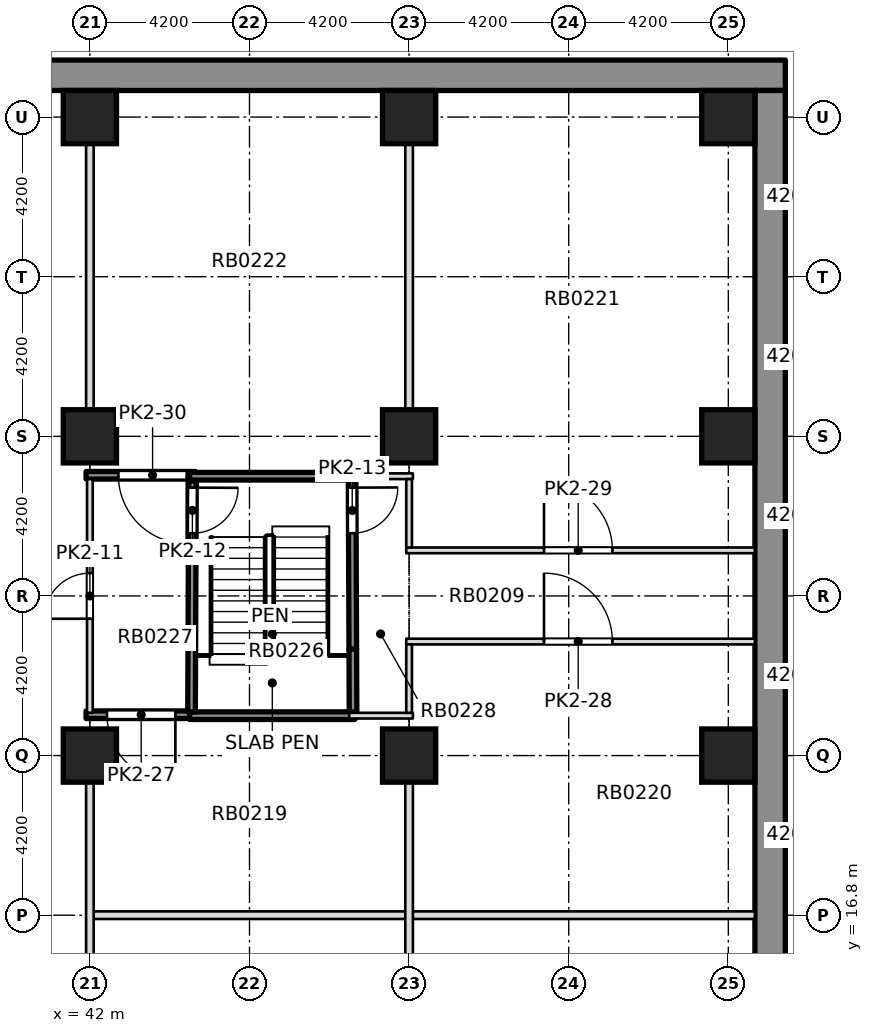
"""IFC4 building model, lengths in metres.
Left out: names, types, materials, properties, quantities, classifications, styles, units other than length and angle.
Written with IfcOpenShell. Run it as: python <this file> out.ifc"""

import sys

from ifc_helpers import new_model, si_unit, direction, frame, frame_2d, origin, origin_2d, place, context, subcontext, project, spatial, rectangle, extrude, element, fill, save


model = new_model("IFC4")
c1 = context("Model", 3, precision=1e-05, world=origin(), true_north=direction((0.0, 1.0)))
c2 = subcontext(c1, "Body", "Model", "MODEL_VIEW")
j1 = project(units=[si_unit("LENGTHUNIT", "METRE"), si_unit("PLANEANGLEUNIT", "RADIAN")], contexts=[c1])
p1 = place(None, origin())
s1 = spatial("IfcSite", under=j1, at=p1, CompositionType="ELEMENT")
p2 = place(p1, origin())
s2 = spatial("IfcBuilding", under=s1, at=p2, CompositionType="ELEMENT")
p3 = place(p2, frame((0.0, 0.0, -8.4)))
s3 = spatial("IfcBuildingStorey", under=s2, at=p3, CompositionType="ELEMENT", Elevation=-8.4)
p4 = place(p3, frame((-43.5, 38.9, -0.5), z_axis=(0.0, 0.0, 1.0), x_axis=(1.0, 0.0, 0.0)))
e1 = element("IfcWall", 1, at=p4, inside=s3, PredefinedType="SOLIDWALL", context=c2, shape_type="SweptSolid", body=[
    extrude(rectangle(XDim=103.8, YDim=0.8, at=frame_2d((51.9, 0.0))), origin(), (0.0, 0.0, 1.0), 4.7),
])
p5 = place(p3, frame((59.9, -38.5, -0.5), z_axis=(0.0, 0.0, 1.0), x_axis=(0.0, 1.0, 0.0)))
e2 = element("IfcWall", 2, at=p5, inside=s3, PredefinedType="SOLIDWALL", context=c2, shape_type="SweptSolid", body=[
    extrude(rectangle(XDim=77.0, YDim=0.8, at=frame_2d((38.5, 0.0))), origin(), (0.0, 0.0, 1.0), 4.7),
])
for number, where, z_axis, x_axis in (
    (3, (42.0, 21.0, -0.5), (0.0, 0.0, 1.0), (1.0, 0.0, 0.0)),
    (4, (50.4, 21.0, -0.5), (0.0, 0.0, 1.0), (1.0, 0.0, 0.0)),
    (5, (58.8, 21.0, -0.5), (0.0, 0.0, 1.0), (1.0, 0.0, 0.0)),
    (6, (42.0, 29.4, -0.5), (0.0, 0.0, 1.0), (1.0, 0.0, 0.0)),
    (7, (50.4, 29.4, -0.5), (0.0, 0.0, 1.0), (1.0, 0.0, 0.0)),
    (8, (58.8, 29.4, -0.5), (0.0, 0.0, 1.0), (1.0, 0.0, 0.0)),
    (9, (42.0, 37.8, -0.5), (0.0, 0.0, 1.0), (1.0, 0.0, 0.0)),
    (10, (50.4, 37.8, -0.5), (0.0, 0.0, 1.0), (1.0, 0.0, 0.0)),
    (11, (58.8, 37.8, -0.5), (0.0, 0.0, 1.0), (1.0, 0.0, 0.0)),
):
    element("IfcColumn", number, at=place(p3, frame(where, z_axis=z_axis, x_axis=x_axis)), inside=s3, PredefinedType="COLUMN", context=c2, shape_type="SweptSolid", body=[
        extrude(rectangle(XDim=1.4, YDim=1.4, at=origin_2d()), origin(), (0.0, 0.0, 1.0), 4.7),
    ])
p6 = place(p3, frame((42.1, 16.8, 0.0), z_axis=(0.0, 0.0, 1.0), x_axis=(1.0, 0.0, 0.0)))
e12 = element("IfcWall", 12, at=p6, inside=s3, PredefinedType="PARTITIONING", context=c2, shape_type="SweptSolid", body=[
    extrude(rectangle(XDim=17.399, YDim=0.2, at=frame_2d((8.699, 0.0))), origin(), (0.0, 0.0, 1.0), 3.85),
])
p7 = place(p3, frame((41.9, 22.075, 0.0), z_axis=(0.0, 0.0, 1.0), x_axis=(1.0, 0.0, 0.0)))
e13 = element("IfcWall", 13, at=p7, inside=s3, PredefinedType="SOLIDWALL", context=c2, shape_type="SweptSolid", body=[
    extrude(rectangle(XDim=2.875, YDim=0.2, at=frame_2d((1.438, 0.0))), origin(), (0.0, 0.0, 1.0), 3.85),
])
p8 = place(p7, frame((0.55, 0.0, 0.0)))
e14 = element("IfcOpeningElement", 14, at=p8, cuts=e13, PredefinedType="OPENING", context=c2, shape_type="SweptSolid", body=[
    extrude(rectangle(XDim=1.8, YDim=2.1, at=frame_2d((0.9, 1.05))), frame((0.0, 0.11, 0.0), z_axis=(0.0, -1.0, 0.0), x_axis=(1.0, 0.0, 0.0)), (0.0, 0.0, 1.0), 0.22),
])
p9 = place(p3, frame((44.625, 22.05, 0.0), z_axis=(0.0, 0.0, 1.0), x_axis=(1.0, 0.0, 0.0)))
e15 = element("IfcWall", 15, at=p9, inside=s3, PredefinedType="SOLIDWALL", context=c2, shape_type="SweptSolid", body=[
    extrude(rectangle(XDim=4.35, YDim=0.2, at=frame_2d((2.175, 0.0))), origin(), (0.0, 0.0, 1.0), 3.85),
])
p10 = place(p3, frame((48.825, 22.05, 0.0), z_axis=(0.0, 0.0, 1.0), x_axis=(1.0, 0.0, 0.0)))
e16 = element("IfcWall", 16, at=p10, inside=s3, PredefinedType="PARTITIONING", context=c2, shape_type="SweptSolid", body=[
    extrude(rectangle(XDim=1.675, YDim=0.15, at=frame_2d((0.837, 0.0))), origin(), (0.0, 0.0, 1.0), 3.85),
])
p11 = place(p3, frame((50.325, 24.0, 0.0), z_axis=(0.0, 0.0, 1.0), x_axis=(1.0, 0.0, 0.0)))
e17 = element("IfcWall", 17, at=p11, inside=s3, PredefinedType="PARTITIONING", context=c2, shape_type="SweptSolid", body=[
    extrude(rectangle(XDim=9.174, YDim=0.15, at=frame_2d((4.587, 0.0))), origin(), (0.0, 0.0, 1.0), 3.85),
])
p12 = place(p11, frame((3.625, 0.0, 0.0)))
e18 = element("IfcOpeningElement", 18, at=p12, cuts=e17, PredefinedType="OPENING", context=c2, shape_type="SweptSolid", body=[
    extrude(rectangle(XDim=1.8, YDim=2.1, at=frame_2d((0.9, 1.05))), frame((0.0, 0.085, 0.0), z_axis=(0.0, -1.0, 0.0), x_axis=(1.0, 0.0, 0.0)), (0.0, 0.0, 1.0), 0.17),
])
p13 = place(p3, frame((50.325, 26.4, 0.0), z_axis=(0.0, 0.0, 1.0), x_axis=(1.0, 0.0, 0.0)))
e19 = element("IfcWall", 19, at=p13, inside=s3, PredefinedType="PARTITIONING", context=c2, shape_type="SweptSolid", body=[
    extrude(rectangle(XDim=9.174, YDim=0.15, at=frame_2d((4.587, 0.0))), origin(), (0.0, 0.0, 1.0), 3.85),
])
p14 = place(p13, frame((3.625, 0.0, 0.0)))
e20 = element("IfcOpeningElement", 20, at=p14, cuts=e19, PredefinedType="OPENING", context=c2, shape_type="SweptSolid", body=[
    extrude(rectangle(XDim=1.8, YDim=2.1, at=frame_2d((0.9, 1.05))), frame((0.0, 0.085, 0.0), z_axis=(0.0, -1.0, 0.0), x_axis=(1.0, 0.0, 0.0)), (0.0, 0.0, 1.0), 0.17),
])
p15 = place(p3, frame((41.9, 28.375, 0.0), z_axis=(0.0, 0.0, 1.0), x_axis=(1.0, 0.0, 0.0)))
e21 = element("IfcWall", 21, at=p15, inside=s3, PredefinedType="SOLIDWALL", context=c2, shape_type="SweptSolid", body=[
    extrude(rectangle(XDim=2.875, YDim=0.2, at=frame_2d((1.438, 0.0))), origin(), (0.0, 0.0, 1.0), 3.85),
])
p16 = place(p15, frame((0.85, 0.0, 0.0)))
e22 = element("IfcOpeningElement", 22, at=p16, cuts=e21, PredefinedType="OPENING", context=c2, shape_type="SweptSolid", body=[
    extrude(rectangle(XDim=1.8, YDim=2.1, at=frame_2d((0.9, 1.05))), frame((0.0, 0.11, 0.0), z_axis=(0.0, -1.0, 0.0), x_axis=(1.0, 0.0, 0.0)), (0.0, 0.0, 1.0), 0.22),
])
p17 = place(p3, frame((44.625, 28.35, 0.0), z_axis=(0.0, 0.0, 1.0), x_axis=(1.0, 0.0, 0.0)))
e23 = element("IfcWall", 23, at=p17, inside=s3, PredefinedType="SOLIDWALL", context=c2, shape_type="SweptSolid", body=[
    extrude(rectangle(XDim=4.35, YDim=0.2, at=frame_2d((2.175, 0.0))), origin(), (0.0, 0.0, 1.0), 3.85),
])
p18 = place(p3, frame((48.825, 28.35, 0.0), z_axis=(0.0, 0.0, 1.0), x_axis=(1.0, 0.0, 0.0)))
e24 = element("IfcWall", 24, at=p18, inside=s3, PredefinedType="PARTITIONING", context=c2, shape_type="SweptSolid", body=[
    extrude(rectangle(XDim=1.675, YDim=0.15, at=frame_2d((0.837, 0.0))), origin(), (0.0, 0.0, 1.0), 3.85),
])
p19 = place(p3, frame((42.0, 13.3, 0.0), z_axis=(0.0, 0.0, 1.0), x_axis=(0.0, 1.0, 0.0)))
e25 = element("IfcWall", 25, at=p19, inside=s3, PredefinedType="PARTITIONING", context=c2, shape_type="SweptSolid", body=[
    extrude(rectangle(XDim=7.0, YDim=0.2, at=frame_2d((3.5, 0.0))), origin(), (0.0, 0.0, 1.0), 3.85),
])
p20 = place(p3, frame((42.0, 22.125, 0.0), z_axis=(0.0, 0.0, 1.0), x_axis=(0.0, 1.0, 0.0)))
e26 = element("IfcWall", 26, at=p20, inside=s3, PredefinedType="PARTITIONING", context=c2, shape_type="SweptSolid", body=[
    extrude(rectangle(XDim=6.15, YDim=0.15, at=frame_2d((3.075, 0.0))), origin(), (0.0, 0.0, 1.0), 3.85),
])
p21 = place(p20, frame((2.475, 0.0, 0.0)))
e27 = element("IfcOpeningElement", 27, at=p21, cuts=e26, PredefinedType="OPENING", context=c2, shape_type="SweptSolid", body=[
    extrude(rectangle(XDim=1.2, YDim=2.1, at=frame_2d((0.6, 1.05))), frame((0.0, 0.085, 0.0), z_axis=(0.0, -1.0, 0.0), x_axis=(1.0, 0.0, 0.0)), (0.0, 0.0, 1.0), 0.17),
])
p22 = place(p3, frame((42.0, 30.1, 0.0), z_axis=(0.0, 0.0, 1.0), x_axis=(0.0, 1.0, 0.0)))
e28 = element("IfcWall", 28, at=p22, inside=s3, PredefinedType="PARTITIONING", context=c2, shape_type="SweptSolid", body=[
    extrude(rectangle(XDim=7.0, YDim=0.2, at=frame_2d((3.5, 0.0))), origin(), (0.0, 0.0, 1.0), 3.85),
])
p23 = place(p3, frame((44.675, 22.15, 0.0), z_axis=(0.0, 0.0, 1.0), x_axis=(0.004098985015, 0.999991599126, 0.0)))
e29 = element("IfcWall", 29, at=p23, inside=s3, PredefinedType="SOLIDWALL", context=c2, shape_type="SweptSolid", body=[
    extrude(rectangle(XDim=6.075, YDim=0.2, at=frame_2d((3.038, 0.0))), origin(), (0.0, 0.0, 1.0), 3.85),
])
p24 = place(p23, frame((4.7, 0.0, 0.0)))
e30 = element("IfcOpeningElement", 30, at=p24, cuts=e29, PredefinedType="OPENING", context=c2, shape_type="SweptSolid", body=[
    extrude(rectangle(XDim=1.2, YDim=2.1, at=frame_2d((0.6, 1.05))), frame((0.0, 0.11, 0.0), z_axis=(0.0, -1.0, 0.0), x_axis=(1.0, 0.0, 0.0)), (0.0, 0.0, 1.0), 0.22),
])
p25 = place(p3, frame((48.918, 23.8, 0.0), z_axis=(0.0, 0.0, 1.0), x_axis=(-0.004091618778, 0.999991629293, 0.0)))
e31 = element("IfcWall", 31, at=p25, inside=s3, PredefinedType="SOLIDWALL", context=c2, shape_type="SweptSolid", body=[
    extrude(rectangle(XDim=4.475, YDim=0.2, at=frame_2d((2.238, 0.0))), origin(), (0.0, 0.0, 1.0), 3.85),
])
p26 = place(p25, frame((3.05, 0.0, 0.0)))
e32 = element("IfcOpeningElement", 32, at=p26, cuts=e31, PredefinedType="OPENING", context=c2, shape_type="SweptSolid", body=[
    extrude(rectangle(XDim=1.2, YDim=2.1, at=frame_2d((0.6, 1.05))), frame((0.0, 0.11, 0.0), z_axis=(0.0, -1.0, 0.0), x_axis=(1.0, 0.0, 0.0)), (0.0, 0.0, 1.0), 0.22),
])
p27 = place(p3, frame((50.4, 13.3, 0.0), z_axis=(0.0, 0.0, 1.0), x_axis=(0.0, 1.0, 0.0)))
e33 = element("IfcWall", 33, at=p27, inside=s3, PredefinedType="PARTITIONING", context=c2, shape_type="SweptSolid", body=[
    extrude(rectangle(XDim=7.0, YDim=0.2, at=frame_2d((3.5, 0.0))), origin(), (0.0, 0.0, 1.0), 3.85),
])
p28 = place(p3, frame((50.4, 22.125, 0.0), z_axis=(0.0, 0.0, 1.0), x_axis=(0.0, 1.0, 0.0)))
e34 = element("IfcWall", 34, at=p28, inside=s3, PredefinedType="PARTITIONING", context=c2, shape_type="SweptSolid", body=[
    extrude(rectangle(XDim=1.8, YDim=0.15, at=frame_2d((0.9, 0.0))), origin(), (0.0, 0.0, 1.0), 3.85),
])
p29 = place(p3, frame((50.4, 26.475, 0.0), z_axis=(0.0, 0.0, 1.0), x_axis=(0.0, 1.0, 0.0)))
e35 = element("IfcWall", 35, at=p29, inside=s3, PredefinedType="PARTITIONING", context=c2, shape_type="SweptSolid", body=[
    extrude(rectangle(XDim=1.8, YDim=0.15, at=frame_2d((0.9, 0.0))), origin(), (0.0, 0.0, 1.0), 3.85),
])
p30 = place(p3, frame((50.4, 30.1, 0.0), z_axis=(0.0, 0.0, 1.0), x_axis=(0.0, 1.0, 0.0)))
e36 = element("IfcWall", 36, at=p30, inside=s3, PredefinedType="PARTITIONING", context=c2, shape_type="SweptSolid", body=[
    extrude(rectangle(XDim=7.0, YDim=0.2, at=frame_2d((3.5, 0.0))), origin(), (0.0, 0.0, 1.0), 3.85),
])
p31 = place(p3, frame((48.925, 22.15, 0.0), z_axis=(0.0, 0.0, 1.0), x_axis=(-0.003995232985, 0.999992019025, 0.0)))
e37 = element("IfcWall", 37, at=p31, inside=s3, PredefinedType="SOLIDWALL", context=c2, shape_type="SweptSolid", body=[
    extrude(rectangle(XDim=1.65, YDim=0.2, at=frame_2d((0.825, 0.0))), origin(), (0.0, 0.0, 1.0), 3.85),
])
p32 = place(p21, origin())
e38 = element("IfcDoor", 38, at=p32, inside=s3, OperationType="DOUBLE_DOOR_SINGLE_SWING", PredefinedType="DOOR", context=c2, shape_type="SweptSolid", body=[
    extrude(rectangle(XDim=1.2, YDim=2.1, at=frame_2d((0.6, 1.05))), frame((0.0, 0.025, 0.0), z_axis=(0.0, -1.0, 0.0), x_axis=(1.0, 0.0, 0.0)), (0.0, 0.0, 1.0), 0.05),
])
fill(e27, e38)
p33 = place(p24, origin())
e39 = element("IfcDoor", 39, at=p33, inside=s3, OperationType="DOUBLE_DOOR_SINGLE_SWING", PredefinedType="DOOR", context=c2, shape_type="SweptSolid", body=[
    extrude(rectangle(XDim=1.2, YDim=2.1, at=frame_2d((0.6, 1.05))), frame((0.0, 0.025, 0.0), z_axis=(0.0, -1.0, 0.0), x_axis=(1.0, 0.0, 0.0)), (0.0, 0.0, 1.0), 0.05),
])
fill(e30, e39)
p34 = place(p26, origin())
e40 = element("IfcDoor", 40, at=p34, inside=s3, OperationType="DOUBLE_DOOR_SINGLE_SWING", PredefinedType="DOOR", context=c2, shape_type="SweptSolid", body=[
    extrude(rectangle(XDim=1.2, YDim=2.1, at=frame_2d((0.6, 1.05))), frame((0.0, 0.025, 0.0), z_axis=(0.0, -1.0, 0.0), x_axis=(1.0, 0.0, 0.0)), (0.0, 0.0, 1.0), 0.05),
])
fill(e32, e40)
p35 = place(p8, origin())
e41 = element("IfcDoor", 41, at=p35, inside=s3, OperationType="DOUBLE_DOOR_SINGLE_SWING", PredefinedType="DOOR", context=c2, shape_type="SweptSolid", body=[
    extrude(rectangle(XDim=1.8, YDim=2.1, at=frame_2d((0.9, 1.05))), frame((0.0, 0.025, 0.0), z_axis=(0.0, -1.0, 0.0), x_axis=(1.0, 0.0, 0.0)), (0.0, 0.0, 1.0), 0.05),
])
fill(e14, e41)
p36 = place(p12, origin())
e42 = element("IfcDoor", 42, at=p36, inside=s3, OperationType="DOUBLE_DOOR_SINGLE_SWING", PredefinedType="DOOR", context=c2, shape_type="SweptSolid", body=[
    extrude(rectangle(XDim=1.8, YDim=2.1, at=frame_2d((0.9, 1.05))), frame((0.0, 0.025, 0.0), z_axis=(0.0, -1.0, 0.0), x_axis=(1.0, 0.0, 0.0)), (0.0, 0.0, 1.0), 0.05),
])
fill(e18, e42)
p37 = place(p14, origin())
e43 = element("IfcDoor", 43, at=p37, inside=s3, OperationType="DOUBLE_DOOR_SINGLE_SWING", PredefinedType="DOOR", context=c2, shape_type="SweptSolid", body=[
    extrude(rectangle(XDim=1.8, YDim=2.1, at=frame_2d((0.9, 1.05))), frame((0.0, 0.025, 0.0), z_axis=(0.0, -1.0, 0.0), x_axis=(1.0, 0.0, 0.0)), (0.0, 0.0, 1.0), 0.05),
])
fill(e20, e43)
p38 = place(p16, origin())
e44 = element("IfcDoor", 44, at=p38, inside=s3, OperationType="DOUBLE_DOOR_SINGLE_SWING", PredefinedType="DOOR", context=c2, shape_type="SweptSolid", body=[
    extrude(rectangle(XDim=1.8, YDim=2.1, at=frame_2d((0.9, 1.05))), frame((0.0, 0.025, 0.0), z_axis=(0.0, -1.0, 0.0), x_axis=(1.0, 0.0, 0.0)), (0.0, 0.0, 1.0), 0.05),
])
fill(e22, e44)
save(model, sys.argv[1])
